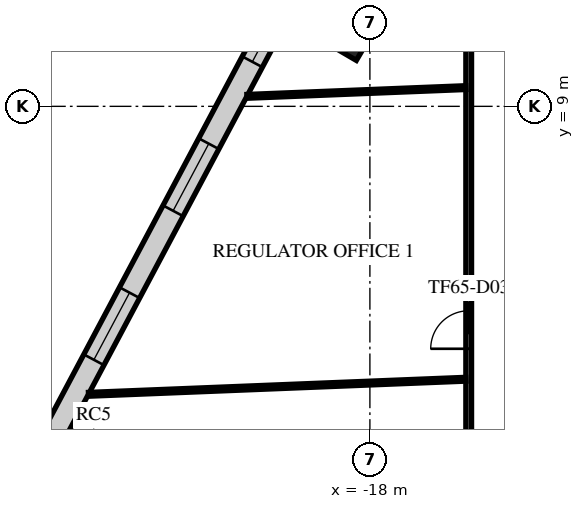
"""IFC4 building model, lengths in metres.
Left out: names, types, materials, properties, quantities, classifications, styles, units other than length and angle.
Written with IfcOpenShell. Run it as: python <this file> out.ifc"""

import sys

from ifc_helpers import new_model, si_unit, direction, frame, frame_2d, origin, origin_2d, place, context, subcontext, project, spatial, rectangle, extrude, element, fill, save


model = new_model("IFC4")
c1 = context("Model", 3, precision=1e-05, world=origin(), true_north=direction((0.0, 1.0)))
c2 = subcontext(c1, "Body", "Model", "MODEL_VIEW")
j1 = project(units=[si_unit("LENGTHUNIT", "METRE"), si_unit("PLANEANGLEUNIT", "RADIAN")], contexts=[c1])
p1 = place(None, origin())
s1 = spatial("IfcSite", under=j1, at=p1, CompositionType="ELEMENT")
p2 = place(p1, origin())
s2 = spatial("IfcBuilding", under=s1, at=p2, CompositionType="ELEMENT")
p3 = place(p2, frame((0.0, 0.0, 274.9)))
s3 = spatial("IfcBuildingStorey", under=s2, at=p3, CompositionType="ELEMENT", Elevation=274.9)
p4 = place(p3, frame((-18.518, 10.825, 0.0), z_axis=(0.0, 0.0, 1.0), x_axis=(0.504643651291, 0.863327739165, 0.0)))
e1 = element("IfcColumn", 1, at=p4, inside=s3, PredefinedType="COLUMN", context=c2, shape_type="SweptSolid", body=[
    extrude(rectangle(XDim=0.9, YDim=0.9, at=origin_2d()), origin(), (0.0, 0.0, 1.0), 4.0),
])
p5 = place(p3, frame((-9.159, 32.618, 0.0), z_axis=(0.0, 0.0, 1.0), x_axis=(-0.469470468388, -0.88294817476, 0.0)))
e2 = element("IfcWall", 2, at=p5, inside=s3, PredefinedType="STANDARD", context=c2, shape_type="SweptSolid", body=[
    extrude(rectangle(XDim=48.843, YDim=0.6, at=frame_2d((24.422, 0.0))), origin(), (0.0, 0.0, 1.0), 3.64),
])
p6 = place(p5, frame((1.22, 0.0, 0.9)))
e3 = element("IfcOpeningElement", 3, at=p6, cuts=e2, PredefinedType="OPENING", context=c2, shape_type="SweptSolid", body=[
    extrude(rectangle(XDim=2.0, YDim=2.1, at=frame_2d((1.0, 1.05))), frame((0.0, 0.31, 0.0), z_axis=(0.0, -1.0, 0.0), x_axis=(1.0, 0.0, 0.0)), (0.0, 0.0, 1.0), 0.62),
])
p7 = place(p5, frame((5.66, 0.0, 0.9)))
e4 = element("IfcOpeningElement", 4, at=p7, cuts=e2, PredefinedType="OPENING", context=c2, shape_type="SweptSolid", body=[
    extrude(rectangle(XDim=2.0, YDim=2.1, at=frame_2d((1.0, 1.05))), frame((0.0, 0.31, 0.0), z_axis=(0.0, -1.0, 0.0), x_axis=(1.0, 0.0, 0.0)), (0.0, 0.0, 1.0), 0.62),
])
p8 = place(p5, frame((10.101, 0.0, 0.9)))
e5 = element("IfcOpeningElement", 5, at=p8, cuts=e2, PredefinedType="OPENING", context=c2, shape_type="SweptSolid", body=[
    extrude(rectangle(XDim=2.0, YDim=2.1, at=frame_2d((1.0, 1.05))), frame((0.0, 0.31, 0.0), z_axis=(0.0, -1.0, 0.0), x_axis=(1.0, 0.0, 0.0)), (0.0, 0.0, 1.0), 0.62),
])
p9 = place(p5, frame((14.541, 0.0, 0.9)))
e6 = element("IfcOpeningElement", 6, at=p9, cuts=e2, PredefinedType="OPENING", context=c2, shape_type="SweptSolid", body=[
    extrude(rectangle(XDim=2.0, YDim=2.1, at=frame_2d((1.0, 1.05))), frame((0.0, 0.31, 0.0), z_axis=(0.0, -1.0, 0.0), x_axis=(1.0, 0.0, 0.0)), (0.0, 0.0, 1.0), 0.62),
])
p10 = place(p5, frame((18.981, 0.0, 0.9)))
e7 = element("IfcOpeningElement", 7, at=p10, cuts=e2, PredefinedType="OPENING", context=c2, shape_type="SweptSolid", body=[
    extrude(rectangle(XDim=2.0, YDim=2.1, at=frame_2d((1.0, 1.05))), frame((0.0, 0.31, 0.0), z_axis=(0.0, -1.0, 0.0), x_axis=(1.0, 0.0, 0.0)), (0.0, 0.0, 1.0), 0.62),
])
p11 = place(p5, frame((23.422, 0.0, 0.9)))
e8 = element("IfcOpeningElement", 8, at=p11, cuts=e2, PredefinedType="OPENING", context=c2, shape_type="SweptSolid", body=[
    extrude(rectangle(XDim=2.0, YDim=2.1, at=frame_2d((1.0, 1.05))), frame((0.0, 0.31, 0.0), z_axis=(0.0, -1.0, 0.0), x_axis=(1.0, 0.0, 0.0)), (0.0, 0.0, 1.0), 0.62),
])
p12 = place(p5, frame((27.862, 0.0, 0.9)))
e9 = element("IfcOpeningElement", 9, at=p12, cuts=e2, PredefinedType="OPENING", context=c2, shape_type="SweptSolid", body=[
    extrude(rectangle(XDim=2.0, YDim=2.1, at=frame_2d((1.0, 1.05))), frame((0.0, 0.31, 0.0), z_axis=(0.0, -1.0, 0.0), x_axis=(1.0, 0.0, 0.0)), (0.0, 0.0, 1.0), 0.62),
])
p13 = place(p5, frame((32.302, 0.0, 0.9)))
e10 = element("IfcOpeningElement", 10, at=p13, cuts=e2, PredefinedType="OPENING", context=c2, shape_type="SweptSolid", body=[
    extrude(rectangle(XDim=2.0, YDim=2.1, at=frame_2d((1.0, 1.05))), frame((0.0, 0.31, 0.0), z_axis=(0.0, -1.0, 0.0), x_axis=(1.0, 0.0, 0.0)), (0.0, 0.0, 1.0), 0.62),
])
p14 = place(p5, frame((36.742, 0.0, 0.9)))
e11 = element("IfcOpeningElement", 11, at=p14, cuts=e2, PredefinedType="OPENING", context=c2, shape_type="SweptSolid", body=[
    extrude(rectangle(XDim=2.0, YDim=2.1, at=frame_2d((1.0, 1.05))), frame((0.0, 0.31, 0.0), z_axis=(0.0, -1.0, 0.0), x_axis=(1.0, 0.0, 0.0)), (0.0, 0.0, 1.0), 0.62),
])
p15 = place(p5, frame((41.183, 0.0, 0.9)))
e12 = element("IfcOpeningElement", 12, at=p15, cuts=e2, PredefinedType="OPENING", context=c2, shape_type="SweptSolid", body=[
    extrude(rectangle(XDim=2.0, YDim=2.1, at=frame_2d((1.0, 1.05))), frame((0.0, 0.31, 0.0), z_axis=(0.0, -1.0, 0.0), x_axis=(1.0, 0.0, 0.0)), (0.0, 0.0, 1.0), 0.62),
])
p16 = place(p5, frame((45.623, 0.0, 0.9)))
e13 = element("IfcOpeningElement", 13, at=p16, cuts=e2, PredefinedType="OPENING", context=c2, shape_type="SweptSolid", body=[
    extrude(rectangle(XDim=2.0, YDim=2.1, at=frame_2d((1.0, 1.05))), frame((0.0, 0.31, 0.0), z_axis=(0.0, -1.0, 0.0), x_axis=(1.0, 0.0, 0.0)), (0.0, 0.0, 1.0), 0.62),
])
p17 = place(p3, frame((-15.4, -10.543, 0.0), z_axis=(0.0, 0.0, 1.0), x_axis=(0.0, 1.0, 0.0)))
e14 = element("IfcWall", 14, at=p17, inside=s3, PredefinedType="PARTITIONING", context=c2, shape_type="SweptSolid", body=[
    extrude(rectangle(XDim=25.943, YDim=0.15, at=frame_2d((12.972, 0.0))), origin(), (0.0, 0.0, 1.0), 3.24),
])
p18 = place(p17, frame((7.55, 0.0, 0.0)))
e15 = element("IfcOpeningElement", 15, at=p18, cuts=e14, PredefinedType="OPENING", context=c2, shape_type="SweptSolid", body=[
    extrude(rectangle(XDim=1.8, YDim=2.1, at=frame_2d((0.9, 1.05))), frame((0.0, 0.085, 0.0), z_axis=(0.0, -1.0, 0.0), x_axis=(1.0, 0.0, 0.0)), (0.0, 0.0, 1.0), 0.17),
])
p19 = place(p17, frame((13.164, 0.0, 0.0)))
e16 = element("IfcOpeningElement", 16, at=p19, cuts=e14, PredefinedType="OPENING", context=c2, shape_type="SweptSolid", body=[
    extrude(rectangle(XDim=1.0, YDim=2.1, at=frame_2d((0.5, 1.05))), frame((0.0, 0.085, 0.0), z_axis=(0.0, -1.0, 0.0), x_axis=(1.0, 0.0, 0.0)), (0.0, 0.0, 1.0), 0.17),
])
p20 = place(p17, frame((22.088, 0.0, 0.0)))
e17 = element("IfcOpeningElement", 17, at=p20, cuts=e14, PredefinedType="OPENING", context=c2, shape_type="SweptSolid", body=[
    extrude(rectangle(XDim=1.0, YDim=2.1, at=frame_2d((0.5, 1.05))), frame((0.0, 0.085, 0.0), z_axis=(0.0, -1.0, 0.0), x_axis=(1.0, 0.0, 0.0)), (0.0, 0.0, 1.0), 0.17),
])
p21 = place(p3, frame((-25.404, 1.422, 0.0), z_axis=(0.0, 0.0, 1.0), x_axis=(0.999201390474, 0.039957243081, 0.0)))
e18 = element("IfcWall", 18, at=p21, inside=s3, PredefinedType="PARTITIONING", context=c2, shape_type="SweptSolid", body=[
    extrude(rectangle(XDim=9.935, YDim=0.1, at=frame_2d((4.967, 0.0))), origin(), (0.0, 0.0, 1.0), 3.04),
])
p22 = place(p3, frame((-21.235, 9.263, 0.0), z_axis=(0.0, 0.0, 1.0), x_axis=(0.999203325676, 0.039908820555, 0.0)))
e19 = element("IfcWall", 19, at=p22, inside=s3, PredefinedType="PARTITIONING", context=c2, shape_type="SweptSolid", body=[
    extrude(rectangle(XDim=5.763, YDim=0.1, at=frame_2d((2.881, 0.0))), origin(), (0.0, 0.0, 1.0), 3.04),
])
p23 = place(p11, origin())
e20 = element("IfcWindow", 20, at=p23, inside=s3, PartitioningType="SINGLE_PANEL", PredefinedType="WINDOW", context=c2, shape_type="SweptSolid", body=[
    extrude(rectangle(XDim=2.0, YDim=2.1, at=frame_2d((1.0, 1.05))), frame((0.0, 0.03, 0.0), z_axis=(0.0, -1.0, 0.0), x_axis=(1.0, 0.0, 0.0)), (0.0, 0.0, 1.0), 0.06),
])
fill(e8, e20)
p24 = place(p12, origin())
e21 = element("IfcWindow", 21, at=p24, inside=s3, PartitioningType="SINGLE_PANEL", PredefinedType="WINDOW", context=c2, shape_type="SweptSolid", body=[
    extrude(rectangle(XDim=2.0, YDim=2.1, at=frame_2d((1.0, 1.05))), frame((0.0, 0.03, 0.0), z_axis=(0.0, -1.0, 0.0), x_axis=(1.0, 0.0, 0.0)), (0.0, 0.0, 1.0), 0.06),
])
fill(e9, e21)
p25 = place(p13, origin())
e22 = element("IfcWindow", 22, at=p25, inside=s3, PartitioningType="SINGLE_PANEL", PredefinedType="WINDOW", context=c2, shape_type="SweptSolid", body=[
    extrude(rectangle(XDim=2.0, YDim=2.1, at=frame_2d((1.0, 1.05))), frame((0.0, 0.03, 0.0), z_axis=(0.0, -1.0, 0.0), x_axis=(1.0, 0.0, 0.0)), (0.0, 0.0, 1.0), 0.06),
])
fill(e10, e22)
p26 = place(p19, origin())
e23 = element("IfcDoor", 23, at=p26, inside=s3, OperationType="SINGLE_SWING_RIGHT", PredefinedType="DOOR", context=c2, shape_type="SweptSolid", body=[
    extrude(rectangle(XDim=1.0, YDim=2.1, at=frame_2d((0.5, 1.05))), frame((0.0, 0.025, 0.0), z_axis=(0.0, -1.0, 0.0), x_axis=(1.0, 0.0, 0.0)), (0.0, 0.0, 1.0), 0.05),
])
fill(e16, e23)
save(model, sys.argv[1])
